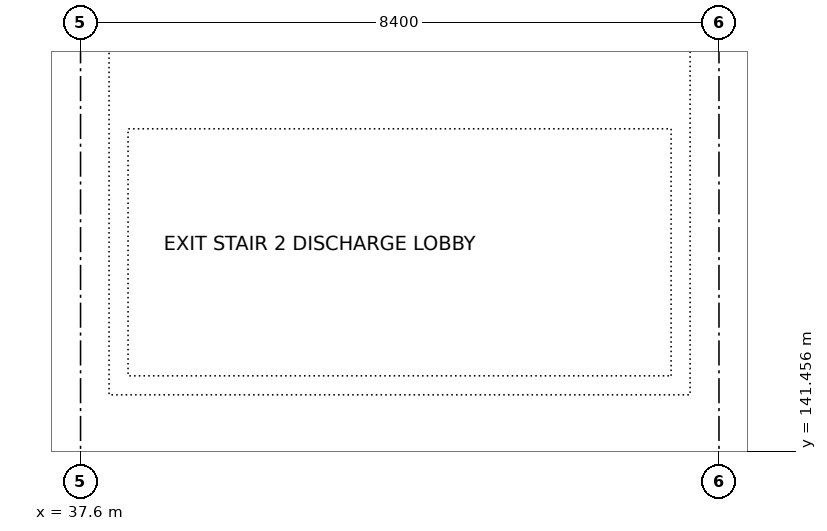
"""IFC4 building model, lengths in metres.
Left out: names, types, materials, properties, quantities, classifications, styles, units other than length and angle.
Written with IfcOpenShell. Run it as: python <this file> out.ifc"""

import sys

from ifc_helpers import new_model, si_unit, direction, frame, frame_2d, origin, place, context, subcontext, project, spatial, rectangle, extrude, element, fill, save


model = new_model("IFC4")
c1 = context("Model", 3, precision=1e-05, world=origin(), true_north=direction((0.0, 1.0)))
c2 = subcontext(c1, "Body", "Model", "MODEL_VIEW")
j1 = project(units=[si_unit("LENGTHUNIT", "METRE"), si_unit("PLANEANGLEUNIT", "RADIAN")], contexts=[c1])
p1 = place(None, origin())
s1 = spatial("IfcSite", under=j1, at=p1, CompositionType="ELEMENT")
p2 = place(p1, origin())
s2 = spatial("IfcBuilding", under=s1, at=p2, CompositionType="ELEMENT")
p3 = place(p2, origin())
s3 = spatial("IfcBuildingStorey", under=s2, at=p3, CompositionType="ELEMENT", Elevation=0.0)
p4 = place(p3, frame((38.1, 142.325, 0.0), z_axis=(0.0, 0.0, 1.0), x_axis=(1.0, 0.0, 0.0)))
e1 = element("IfcWall", 1, at=p4, inside=s3, PredefinedType="SOLIDWALL", context=c2, shape_type="SweptSolid", body=[
    extrude(rectangle(XDim=7.395, YDim=0.25, at=frame_2d((3.698, 0.0))), origin(), (0.0, 0.0, 1.0), 2.8),
])
p5 = place(p4, frame((0.55, 0.0, 0.0)))
e2 = element("IfcOpeningElement", 2, at=p5, cuts=e1, PredefinedType="OPENING", context=c2, shape_type="SweptSolid", body=[
    extrude(rectangle(XDim=1.1, YDim=2.1, at=frame_2d((0.55, 1.05))), frame((0.0, 0.135, 0.0), z_axis=(0.0, -1.0, 0.0), x_axis=(1.0, 0.0, 0.0)), (0.0, 0.0, 1.0), 0.27),
])
p6 = place(p3, frame((38.1, 145.825, 0.0), z_axis=(0.0, 0.0, 1.0), x_axis=(1.0, 0.0, 0.0)))
e3 = element("IfcWall", 3, at=p6, inside=s3, PredefinedType="SOLIDWALL", context=c2, shape_type="SweptSolid", body=[
    extrude(rectangle(XDim=7.395, YDim=0.25, at=frame_2d((3.698, 0.0))), origin(), (0.0, 0.0, 1.0), 2.8),
])
for number, where, z_axis, x_axis in (
    (4, (38.1, 142.325, 0.0), (0.0, 0.0, 1.0), (0.0, 1.0, 0.0)),
    (5, (45.495, 142.325, 0.0), (0.0, 0.0, 1.0), (0.0, 1.0, 0.0)),
):
    element("IfcWall", number, at=place(p3, frame(where, z_axis=z_axis, x_axis=x_axis)), inside=s3, PredefinedType="SOLIDWALL", context=c2, shape_type="SweptSolid", body=[
        extrude(rectangle(XDim=3.5, YDim=0.25, at=frame_2d((1.75, 0.0))), origin(), (0.0, 0.0, 1.0), 2.8),
    ])
p7 = place(p5, frame((1.1, 0.0, 0.0), z_axis=(0.0, 0.0, 1.0), x_axis=(-1.0, 0.0, 0.0)))
e6 = element("IfcDoor", 6, at=p7, inside=s3, OperationType="SINGLE_SWING_RIGHT", PredefinedType="DOOR", context=c2, shape_type="SweptSolid", body=[
    extrude(rectangle(XDim=1.1, YDim=2.1, at=frame_2d((0.55, 1.05))), frame((0.0, 0.025, 0.0), z_axis=(0.0, -1.0, 0.0), x_axis=(1.0, 0.0, 0.0)), (0.0, 0.0, 1.0), 0.05),
])
fill(e2, e6)
save(model, sys.argv[1])
